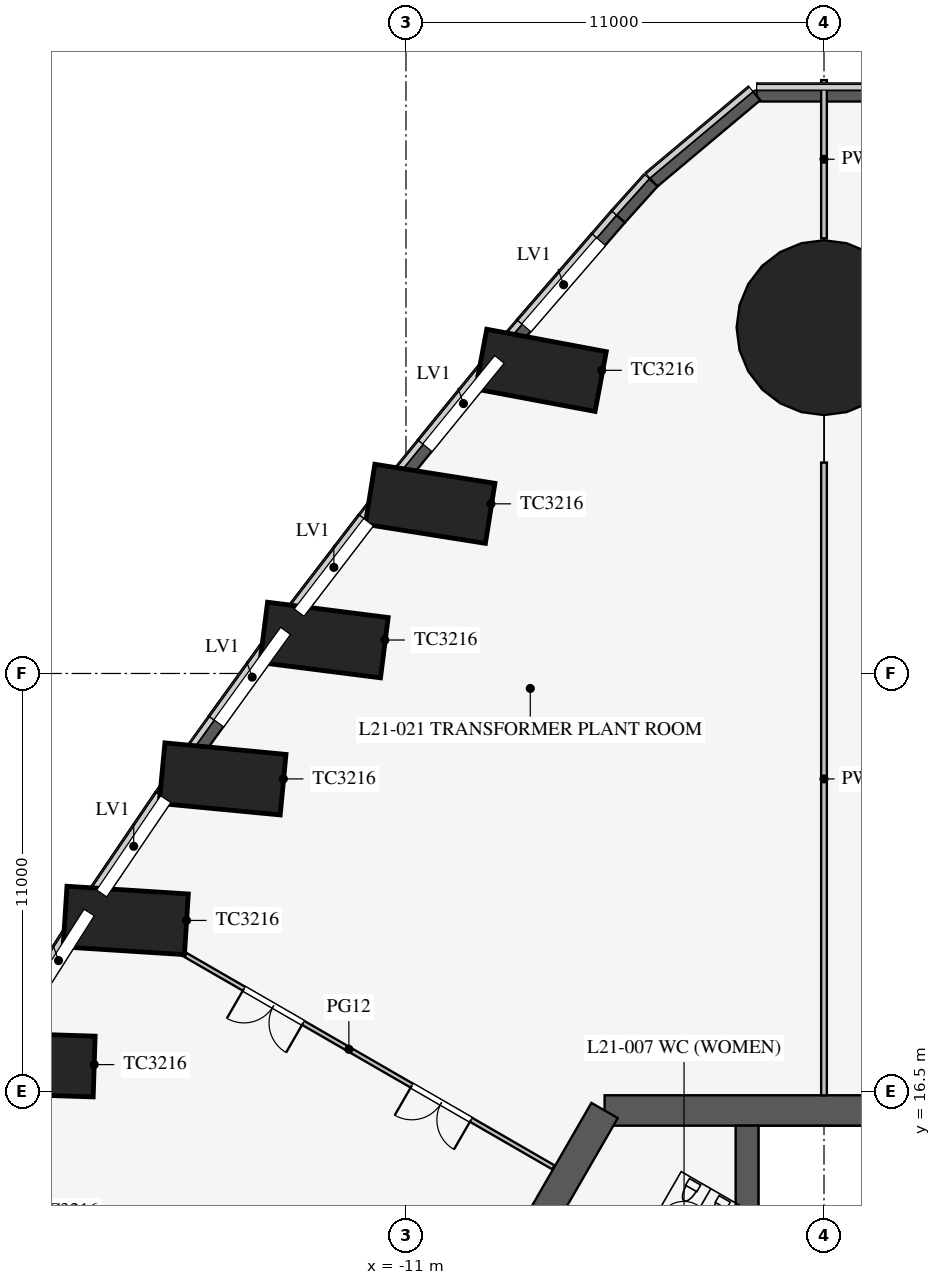
"""IFC4 building model, lengths in metres.
Left out: names, types, materials, properties, quantities, classifications, styles, units other than length and angle.
Written with IfcOpenShell. Run it as: python <this file> out.ifc"""

import sys

from ifc_helpers import new_model, si_unit, direction, frame, frame_2d, origin, origin_2d, place, context, subcontext, project, spatial, polyline, rectangle, circle, outline, extrude, clip, halfspace, element, fill, save


model = new_model("IFC4")
c1 = context("Model", 3, precision=1e-05, world=origin(), true_north=direction((0.0, 1.0)))
c2 = subcontext(c1, "Body", "Model", "MODEL_VIEW")
j1 = project(units=[si_unit("LENGTHUNIT", "METRE"), si_unit("PLANEANGLEUNIT", "RADIAN")], contexts=[c1])
p1 = place(None, origin())
s1 = spatial("IfcSite", under=j1, at=p1, CompositionType="ELEMENT")
p2 = place(p1, origin())
s2 = spatial("IfcBuilding", under=s1, at=p2, CompositionType="ELEMENT")
p3 = place(p2, frame((0.0, 0.0, 92.1)))
s3 = spatial("IfcBuildingStorey", under=s2, at=p3, CompositionType="ELEMENT", Elevation=92.1)
p4 = place(p3, frame((-7.776, 35.667, 0.0), z_axis=(0.260253003307, -0.150307169968, 0.953769431742), x_axis=(-0.643899329697, -0.763098944981, 0.055440539186)))
e1 = element("IfcColumn", 1, at=p4, inside=s3, PredefinedType="COLUMN", context=c2, shape_type="Clipping", body=[
    clip(clip(extrude(rectangle(XDim=3.2, YDim=1.6, at=origin_2d()), origin(), (0.0, 0.0, 1.0), 6.291), halfspace(frame((0.0, 0.0, 0.342), z_axis=(-4.541465322707716e-05, 7.087809625216934e-06, 0.9999999989436362), x_axis=(0.0, 0.9999999999748815, -7.087809632526204e-06)), True)), halfspace(frame((-0.0, 0.0, 5.949), z_axis=(4.541465322707716e-05, -7.087809625216934e-06, -0.9999999989436362), x_axis=(0.0, -0.9999999999748815, 7.087809632526204e-06)), True)),
])
p5 = place(p3, frame((-10.66, 32.135, 0.0), z_axis=(0.236939319597, -0.136786078955, 0.961846831586), x_axis=(-0.624285377749, -0.780019899069, 0.042857020249)))
e2 = element("IfcColumn", 2, at=p5, inside=s3, PredefinedType="COLUMN", context=c2, shape_type="Clipping", body=[
    clip(clip(extrude(rectangle(XDim=3.2, YDim=1.6, at=origin_2d()), origin(), (0.0, 0.0, 1.0), 6.238), halfspace(frame((0.0, 0.0, 0.297), z_axis=(6.818020812683623e-06, 1.7282144695263124e-05, 0.9999999998274212), x_axis=(0.0, 0.9999999998506638, -1.7282144695664807e-05)), True)), halfspace(frame((0.0, 0.0, 5.941), z_axis=(-6.818020812683623e-06, -1.7282144695263124e-05, -0.9999999998274212), x_axis=(0.0, -0.9999999998506638, 1.7282144695664807e-05)), True)),
])
p6 = place(p3, frame((-13.426, 28.536, 0.0), z_axis=(0.217636836674, -0.125674836379, 0.967904976133), x_axis=(-0.601725651442, -0.798074459643, 0.031676446499)))
e3 = element("IfcColumn", 3, at=p6, inside=s3, PredefinedType="COLUMN", context=c2, shape_type="Clipping", body=[
    clip(clip(extrude(rectangle(XDim=3.2, YDim=1.6, at=origin_2d()), origin(), (0.0, 0.0, 1.0), 6.199), halfspace(frame((0.0, 0.0, 0.259), z_axis=(-2.1942927783215323e-05, 2.0499894571701646e-05, 0.9999999995491311), x_axis=(0.0, 0.9999999997898772, -2.0499894576636914e-05)), True)), halfspace(frame((0.0, 0.0, 5.939), z_axis=(2.1942927783215323e-05, -2.0499894571701646e-05, -0.9999999995491311), x_axis=(0.0, -0.9999999997898772, 2.0499894576636914e-05)), True)),
])
p7 = place(p3, frame((-16.076, 24.87, 0.0), z_axis=(0.20262976704, -0.116980910023, 0.972243099332), x_axis=(-0.577645682079, -0.81598540612, 0.022209974679)))
e4 = element("IfcColumn", 4, at=p7, inside=s3, PredefinedType="COLUMN", context=c2, shape_type="Clipping", body=[
    clip(clip(extrude(rectangle(XDim=3.2, YDim=1.6, at=origin_2d()), origin(), (0.0, 0.0, 1.0), 6.171), halfspace(frame((0.0, 0.0, 0.229), z_axis=(6.6490654311614225e-06, -1.841628814169827e-06, 0.9999999999761991), x_axis=(0.0, 0.9999999999983042, 1.8416288142105364e-06)), True)), halfspace(frame((0.0, 0.0, 5.942), z_axis=(-6.6490654311614225e-06, 1.841628814169827e-06, -0.9999999999761991), x_axis=(0.0, -0.9999999999983042, -1.8416288142105364e-06)), True)),
])
p8 = place(p3, frame((-18.611, 21.137, 0.0), z_axis=(0.191886340443, -0.110783015409, 0.975144479474), x_axis=(-0.552576194945, -0.833343769153, 0.014060981253)))
e5 = element("IfcColumn", 5, at=p8, inside=s3, PredefinedType="COLUMN", context=c2, shape_type="Clipping", body=[
    clip(clip(extrude(rectangle(XDim=3.2, YDim=1.6, at=origin_2d()), origin(), (0.0, 0.0, 1.0), 6.153), halfspace(frame((0.0, 0.0, 0.205), z_axis=(3.711813696356814e-06, -2.269742593100088e-05, 0.9999999997355247), x_axis=(0.0, 0.9999999997424135, 2.269742593115724e-05)), True)), halfspace(frame((0.0, 0.0, 5.947), z_axis=(-3.711813696356814e-06, 2.269742593100088e-05, -0.9999999997355247), x_axis=(0.0, -0.9999999997424135, -2.269742593115724e-05)), True)),
])
p9 = place(p3, frame((-21.031, 17.339, 0.0), z_axis=(0.185417945913, -0.107037626655, 0.976812741427), x_axis=(-0.526586350374, -0.850094417042, 0.006804242326)))
e6 = element("IfcColumn", 6, at=p9, inside=s3, PredefinedType="COLUMN", context=c2, shape_type="Clipping", body=[
    clip(clip(extrude(rectangle(XDim=3.2, YDim=1.6, at=origin_2d()), origin(), (0.0, 0.0, 1.0), 6.142), halfspace(frame((0.0, 0.0, 0.187), z_axis=(1.1842135642686942e-05, -5.278007838949161e-06, 0.9999999999159532), x_axis=(0.0, 0.9999999999860714, 5.278007839319245e-06)), True)), halfspace(frame((0.0, 0.0, 5.955), z_axis=(-1.1842135642686942e-05, 5.278007838949161e-06, -0.9999999999159532), x_axis=(0.0, -0.9999999999860714, -5.278007839319245e-06)), True)),
])
p10 = place(p3, frame((0.0, 37.0, 0.0), z_axis=(0.0, -0.316227766017, 0.948683298051), x_axis=(1.0, 0.0, 0.0)))
e7 = element("IfcColumn", 7, at=p10, inside=s3, PredefinedType="COLUMN", context=c2, shape_type="Clipping", body=[
    clip(clip(extrude(circle(Radius=2.3, at=origin_2d()), origin(), (0.0, 0.0, 1.0), 6.324), halfspace(frame((0.0, 0.0, 0.768), z_axis=(0.0, 0.0, 1.0), x_axis=(0.0, 1.0, 0.0)), True)), halfspace(frame((0.0, 0.0, 5.557), z_axis=(0.0, 0.0, -1.0), x_axis=(0.0, -1.0, 0.0)), True)),
])
p11 = place(p3, frame((5.773, 16.0, 0.0), z_axis=(0.0, 0.0, 1.0), x_axis=(-1.0, 0.0, 0.0)))
e8 = element("IfcWall", 8, at=p11, inside=s3, PredefinedType="SHEAR", context=c2, shape_type="SweptSolid", body=[
    extrude(rectangle(XDim=11.547, YDim=0.8, at=frame_2d((5.773, 0.0))), origin(), (0.0, 0.0, 1.0), 6.0),
])
p12 = place(p3, frame((-5.773, 16.0, 0.0), z_axis=(0.0, 0.0, 1.0), x_axis=(-0.500002442456, -0.866023993627, 0.0)))
e9 = element("IfcWall", 9, at=p12, inside=s3, PredefinedType="SHEAR", context=c2, shape_type="SweptSolid", body=[
    extrude(rectangle(XDim=21.939, YDim=0.8, at=frame_2d((10.97, 0.0))), origin(), (0.0, 0.0, 1.0), 6.0),
])
p13 = place(p12, frame((17.27, 0.0, 0.0)))
e10 = element("IfcOpeningElement", 10, at=p13, cuts=e9, PredefinedType="OPENING", context=c2, shape_type="SweptSolid", body=[
    extrude(rectangle(XDim=1.2, YDim=2.1, at=frame_2d((0.6, 1.05))), frame((0.0, 0.41, 0.0), z_axis=(0.0, -1.0, 0.0), x_axis=(1.0, 0.0, 0.0)), (0.0, 0.0, 1.0), 0.82),
])
p14 = place(p12, frame((3.47, 0.0, 0.0)))
e11 = element("IfcOpeningElement", 11, at=p14, cuts=e9, PredefinedType="OPENING", context=c2, shape_type="SweptSolid", body=[
    extrude(rectangle(XDim=1.2, YDim=2.1, at=frame_2d((0.6, 1.05))), frame((0.0, 0.41, 0.0), z_axis=(0.0, -1.0, 0.0), x_axis=(1.0, 0.0, 0.0)), (0.0, 0.0, 1.0), 0.82),
])
p15 = place(p3, frame((-2.025, 6.525, 0.0), z_axis=(0.0, 0.0, 1.0), x_axis=(0.0, 1.0, 0.0)))
e12 = element("IfcWall", 12, at=p15, inside=s3, PredefinedType="SHEAR", context=c2, shape_type="SweptSolid", body=[
    extrude(rectangle(XDim=9.075, YDim=0.6, at=frame_2d((4.538, 0.0))), origin(), (0.0, 0.0, 1.0), 6.0),
])
p16 = place(p3, frame((1.773, 42.701, 0.0), z_axis=(0.0, 0.0, 1.0), x_axis=(-1.0, 0.0, 0.0)))
e13 = element("IfcWall", 13, at=p16, inside=s3, PredefinedType="SOLIDWALL", context=c2, shape_type="SweptSolid", body=[
    extrude(rectangle(XDim=3.545, YDim=0.3, at=frame_2d((1.773, 0.0))), origin(), (0.0, 0.0, 1.0), 5.8),
])
p17 = place(p3, frame((-1.773, 42.701, 0.0), z_axis=(0.0, 0.0, 1.0), x_axis=(-0.766072328399, -0.64275437584, 0.0)))
e14 = element("IfcWall", 14, at=p17, inside=s3, PredefinedType="SOLIDWALL", context=c2, shape_type="SweptSolid", body=[
    extrude(rectangle(XDim=3.546, YDim=0.3, at=frame_2d((1.773, 0.0))), origin(), (0.0, 0.0, 1.0), 5.8),
])
p18 = place(p3, frame((-4.489, 40.422, 0.0), z_axis=(0.0, 0.0, 1.0), x_axis=(-0.668546439873, -0.743670395896, 0.0)))
e15 = element("IfcWall", 15, at=p18, inside=s3, PredefinedType="SOLIDWALL", context=c2, shape_type="SweptSolid", body=[
    extrude(rectangle(XDim=1.29, YDim=0.3, at=frame_2d((0.645, 0.0))), origin(), (0.0, 0.0, 1.0), 5.8),
])
p19 = place(p3, frame((-5.352, 39.463, 0.0), z_axis=(0.0, 0.0, 1.0), x_axis=(-0.654364441553, -0.756179329016, 0.0)))
e16 = element("IfcWall", 16, at=p19, inside=s3, PredefinedType="SOLIDWALL", context=c2, shape_type="SweptSolid", body=[
    extrude(rectangle(XDim=4.582, YDim=0.3, at=frame_2d((2.291, 0.0))), origin(), (0.0, 0.0, 1.0), 5.8),
])
p20 = place(p19, frame((0.791, 0.0, 3.5)))
e17 = element("IfcOpeningElement", 17, at=p20, cuts=e16, PredefinedType="OPENING", context=c2, shape_type="SweptSolid", body=[
    extrude(rectangle(XDim=3.0, YDim=2.0, at=frame_2d((1.5, 1.0))), frame((0.0, 0.16, 0.0), z_axis=(0.0, -1.0, 0.0), x_axis=(1.0, 0.0, 0.0)), (0.0, 0.0, 1.0), 0.32),
])
p21 = place(p3, frame((-8.35, 35.998, 0.0), z_axis=(0.0, 0.0, 1.0), x_axis=(-0.631833879056, -0.775103831288, 0.0)))
e18 = element("IfcWall", 18, at=p21, inside=s3, PredefinedType="SOLIDWALL", context=c2, shape_type="SweptSolid", body=[
    extrude(rectangle(XDim=4.558, YDim=0.3, at=frame_2d((2.279, 0.0))), origin(), (0.0, 0.0, 1.0), 5.8),
])
p22 = place(p21, frame((0.3, 0.0, 3.5)))
e19 = element("IfcOpeningElement", 19, at=p22, cuts=e18, PredefinedType="OPENING", context=c2, shape_type="SweptSolid", body=[
    extrude(rectangle(XDim=3.0, YDim=2.0, at=frame_2d((1.5, 1.0))), frame((0.0, 0.16, 0.0), z_axis=(0.0, -1.0, 0.0), x_axis=(1.0, 0.0, 0.0)), (0.0, 0.0, 1.0), 0.32),
])
p23 = place(p3, frame((-11.23, 32.465, 0.0), z_axis=(0.0, 0.0, 1.0), x_axis=(-0.608784932975, -0.79333530451, 0.0)))
e20 = element("IfcWall", 20, at=p23, inside=s3, PredefinedType="SOLIDWALL", context=c2, shape_type="SweptSolid", body=[
    extrude(rectangle(XDim=4.539, YDim=0.3, at=frame_2d((2.27, 0.0))), origin(), (0.0, 0.0, 1.0), 5.8),
])
p24 = place(p23, frame((1.239, 0.0, 3.5)))
e21 = element("IfcOpeningElement", 21, at=p24, cuts=e20, PredefinedType="OPENING", context=c2, shape_type="SweptSolid", body=[
    extrude(rectangle(XDim=3.0, YDim=2.0, at=frame_2d((1.5, 1.0))), frame((0.0, 0.16, 0.0), z_axis=(0.0, -1.0, 0.0), x_axis=(1.0, 0.0, 0.0)), (0.0, 0.0, 1.0), 0.32),
])
p25 = place(p3, frame((-13.993, 28.864, 0.0), z_axis=(0.0, 0.0, 1.0), x_axis=(-0.585376255171, -0.810761765183, 0.0)))
e22 = element("IfcWall", 22, at=p25, inside=s3, PredefinedType="SOLIDWALL", context=c2, shape_type="SweptSolid", body=[
    extrude(rectangle(XDim=4.523, YDim=0.3, at=frame_2d((2.262, 0.0))), origin(), (0.0, 0.0, 1.0), 5.8),
])
p26 = place(p25, frame((0.3, 0.0, 3.5)))
e23 = element("IfcOpeningElement", 23, at=p26, cuts=e22, PredefinedType="OPENING", context=c2, shape_type="SweptSolid", body=[
    extrude(rectangle(XDim=3.0, YDim=2.0, at=frame_2d((1.5, 1.0))), frame((0.0, 0.16, 0.0), z_axis=(0.0, -1.0, 0.0), x_axis=(1.0, 0.0, 0.0)), (0.0, 0.0, 1.0), 0.32),
])
p27 = place(p3, frame((-16.641, 25.196, 0.0), z_axis=(0.0, 0.0, 1.0), x_axis=(-0.561512004239, -0.827468591002, 0.0)))
e24 = element("IfcWall", 24, at=p27, inside=s3, PredefinedType="SOLIDWALL", context=c2, shape_type="SweptSolid", body=[
    extrude(rectangle(XDim=4.512, YDim=0.3, at=frame_2d((2.256, 0.0))), origin(), (0.0, 0.0, 1.0), 5.8),
])
p28 = place(p27, frame((1.212, 0.0, 3.5)))
e25 = element("IfcOpeningElement", 25, at=p28, cuts=e24, PredefinedType="OPENING", context=c2, shape_type="SweptSolid", body=[
    extrude(rectangle(XDim=3.0, YDim=2.0, at=frame_2d((1.5, 1.0))), frame((0.0, 0.16, 0.0), z_axis=(0.0, -1.0, 0.0), x_axis=(1.0, 0.0, 0.0)), (0.0, 0.0, 1.0), 0.32),
])
p29 = place(p3, frame((-19.175, 21.463, 0.0), z_axis=(0.0, 0.0, 1.0), x_axis=(-0.537243691336, -0.843427066272, 0.0)))
e26 = element("IfcWall", 26, at=p29, inside=s3, PredefinedType="SOLIDWALL", context=c2, shape_type="SweptSolid", body=[
    extrude(rectangle(XDim=4.504, YDim=0.3, at=frame_2d((2.252, 0.0))), origin(), (0.0, 0.0, 1.0), 5.8),
])
p30 = place(p29, frame((0.3, 0.0, 3.5)))
e27 = element("IfcOpeningElement", 27, at=p30, cuts=e26, PredefinedType="OPENING", context=c2, shape_type="SweptSolid", body=[
    extrude(rectangle(XDim=3.0, YDim=2.0, at=frame_2d((1.5, 1.0))), frame((0.0, 0.16, 0.0), z_axis=(0.0, -1.0, 0.0), x_axis=(1.0, 0.0, 0.0)), (0.0, 0.0, 1.0), 0.32),
])
p31 = place(p3, frame((0.0, 16.4, 0.0), z_axis=(0.0, 0.0, 1.0), x_axis=(0.0, 1.0, 0.0)))
e28 = element("IfcWall", 28, at=p31, inside=s3, PredefinedType="PARTITIONING", context=c2, shape_type="SweptSolid", body=[
    extrude(rectangle(XDim=16.65, YDim=0.15, at=frame_2d((8.325, 0.0))), origin(), (0.0, 0.0, 1.0), 4.1),
])
p32 = place(p3, frame((0.0, 38.95, 0.0), z_axis=(0.0, 0.0, 1.0), x_axis=(0.0, 1.0, 0.0)))
e29 = element("IfcWall", 29, at=p32, inside=s3, PredefinedType="PARTITIONING", context=c2, shape_type="SweptSolid", body=[
    extrude(rectangle(XDim=4.164, YDim=0.15, at=frame_2d((2.082, 0.0))), origin(), (0.0, 0.0, 1.0), 4.1),
])
p33 = place(p3, frame((-17.316, 20.39, 0.0), z_axis=(0.0, 0.0, 1.0), x_axis=(-0.865911816314, 0.500196687681, 0.0)))
e30 = element("IfcWall", 30, at=p33, inside=s3, PredefinedType="PARTITIONING", context=c2, shape_type="SweptSolid", body=[
    extrude(outline(polyline([(0.0, 0.0), (0.654, 0.0), (0.653, 0.05), (0.0, 2.9), (0.0, 0.0)])), frame((0.0, 0.06, 0.0), z_axis=(0.0, -1.0, 0.0), x_axis=(1.0, 0.0, 0.0)), (0.0, 0.0, 1.0), 0.12),
])
p34 = place(p3, frame((-7.122, 14.504, 0.0), z_axis=(0.0, 0.0, 1.0), x_axis=(-0.866023947468, 0.500002522405, 0.0)))
e31 = element("IfcWall", 31, at=p34, inside=s3, PredefinedType="PARTITIONING", context=c2, shape_type="SweptSolid", body=[
    extrude(rectangle(XDim=11.771, YDim=0.12, at=frame_2d((5.886, 0.0))), origin(), (0.0, 0.0, 1.0), 2.9),
])
p35 = place(p34, frame((2.5, 0.0, 0.0)))
e32 = element("IfcOpeningElement", 32, at=p35, cuts=e31, PredefinedType="OPENING", context=c2, shape_type="SweptSolid", body=[
    extrude(rectangle(XDim=1.8, YDim=2.1, at=frame_2d((0.9, 1.05))), frame((0.0, 0.07, 0.0), z_axis=(0.0, -1.0, 0.0), x_axis=(1.0, 0.0, 0.0)), (0.0, 0.0, 1.0), 0.14),
])
p36 = place(p34, frame((7.6, 0.0, 0.0)))
e33 = element("IfcOpeningElement", 33, at=p36, cuts=e31, PredefinedType="OPENING", context=c2, shape_type="SweptSolid", body=[
    extrude(rectangle(XDim=1.8, YDim=2.1, at=frame_2d((0.9, 1.05))), frame((0.0, 0.07, 0.0), z_axis=(0.0, -1.0, 0.0), x_axis=(1.0, 0.0, 0.0)), (0.0, 0.0, 1.0), 0.14),
])
p37 = place(p20, origin())
e34 = element("IfcWindow", 34, at=p37, inside=s3, PartitioningType="SINGLE_PANEL", PredefinedType="USERDEFINED", context=c2, shape_type="SweptSolid", body=[
    extrude(rectangle(XDim=3.0, YDim=2.0, at=frame_2d((1.5, 1.0))), frame((0.0, 0.03, 0.0), z_axis=(0.0, -1.0, 0.0), x_axis=(1.0, 0.0, 0.0)), (0.0, 0.0, 1.0), 0.06),
])
fill(e17, e34)
p38 = place(p22, origin())
e35 = element("IfcWindow", 35, at=p38, inside=s3, PartitioningType="SINGLE_PANEL", PredefinedType="USERDEFINED", context=c2, shape_type="SweptSolid", body=[
    extrude(rectangle(XDim=3.0, YDim=2.0, at=frame_2d((1.5, 1.0))), frame((0.0, 0.03, 0.0), z_axis=(0.0, -1.0, 0.0), x_axis=(1.0, 0.0, 0.0)), (0.0, 0.0, 1.0), 0.06),
])
fill(e19, e35)
p39 = place(p24, origin())
e36 = element("IfcWindow", 36, at=p39, inside=s3, PartitioningType="SINGLE_PANEL", PredefinedType="USERDEFINED", context=c2, shape_type="SweptSolid", body=[
    extrude(rectangle(XDim=3.0, YDim=2.0, at=frame_2d((1.5, 1.0))), frame((0.0, 0.03, 0.0), z_axis=(0.0, -1.0, 0.0), x_axis=(1.0, 0.0, 0.0)), (0.0, 0.0, 1.0), 0.06),
])
fill(e21, e36)
p40 = place(p26, origin())
e37 = element("IfcWindow", 37, at=p40, inside=s3, PartitioningType="SINGLE_PANEL", PredefinedType="USERDEFINED", context=c2, shape_type="SweptSolid", body=[
    extrude(rectangle(XDim=3.0, YDim=2.0, at=frame_2d((1.5, 1.0))), frame((0.0, 0.03, 0.0), z_axis=(0.0, -1.0, 0.0), x_axis=(1.0, 0.0, 0.0)), (0.0, 0.0, 1.0), 0.06),
])
fill(e23, e37)
p41 = place(p28, origin())
e38 = element("IfcWindow", 38, at=p41, inside=s3, PartitioningType="SINGLE_PANEL", PredefinedType="USERDEFINED", context=c2, shape_type="SweptSolid", body=[
    extrude(rectangle(XDim=3.0, YDim=2.0, at=frame_2d((1.5, 1.0))), frame((0.0, 0.03, 0.0), z_axis=(0.0, -1.0, 0.0), x_axis=(1.0, 0.0, 0.0)), (0.0, 0.0, 1.0), 0.06),
])
fill(e25, e38)
p42 = place(p30, origin())
e39 = element("IfcWindow", 39, at=p42, inside=s3, PartitioningType="SINGLE_PANEL", PredefinedType="USERDEFINED", context=c2, shape_type="SweptSolid", body=[
    extrude(rectangle(XDim=3.0, YDim=2.0, at=frame_2d((1.5, 1.0))), frame((0.0, 0.03, 0.0), z_axis=(0.0, -1.0, 0.0), x_axis=(1.0, 0.0, 0.0)), (0.0, 0.0, 1.0), 0.06),
])
fill(e27, e39)
p43 = place(p35, origin())
e40 = element("IfcDoor", 40, at=p43, inside=s3, OperationType="DOUBLE_DOOR_SINGLE_SWING", PredefinedType="DOOR", context=c2, shape_type="SweptSolid", body=[
    extrude(rectangle(XDim=1.8, YDim=2.1, at=frame_2d((0.9, 1.05))), frame((0.0, 0.025, 0.0), z_axis=(0.0, -1.0, 0.0), x_axis=(1.0, 0.0, 0.0)), (0.0, 0.0, 1.0), 0.05),
])
fill(e32, e40)
p44 = place(p36, origin())
e41 = element("IfcDoor", 41, at=p44, inside=s3, OperationType="DOUBLE_DOOR_SINGLE_SWING", PredefinedType="DOOR", context=c2, shape_type="SweptSolid", body=[
    extrude(rectangle(XDim=1.8, YDim=2.1, at=frame_2d((0.9, 1.05))), frame((0.0, 0.025, 0.0), z_axis=(0.0, -1.0, 0.0), x_axis=(1.0, 0.0, 0.0)), (0.0, 0.0, 1.0), 0.05),
])
fill(e33, e41)
save(model, sys.argv[1])
